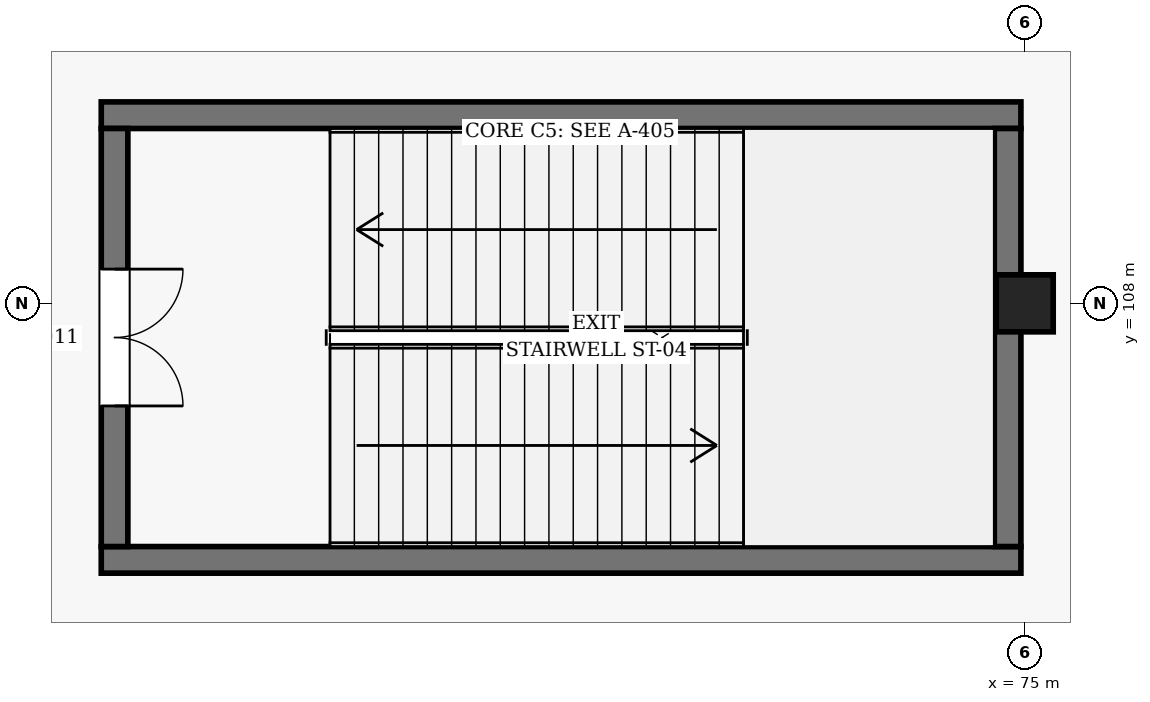
"""IFC4 building model, lengths in metres.
Left out: names, types, materials, properties, quantities, classifications, styles, units other than length and angle.
Written with IfcOpenShell. Run it as: python <this file> out.ifc"""

import sys

from ifc_helpers import new_model, si_unit, direction, frame, frame_2d, origin, origin_2d, place, context, subcontext, project, spatial, rectangle, extrude, element, fill, save


model = new_model("IFC4")
c1 = context("Model", 3, precision=1e-05, world=origin(), true_north=direction((0.0, 1.0)))
c2 = subcontext(c1, "Body", "Model", "MODEL_VIEW")
j1 = project(units=[si_unit("LENGTHUNIT", "METRE"), si_unit("PLANEANGLEUNIT", "RADIAN")], contexts=[c1])
p1 = place(None, origin())
s1 = spatial("IfcSite", under=j1, at=p1, CompositionType="ELEMENT")
p2 = place(p1, origin())
s2 = spatial("IfcBuilding", under=s1, at=p2, CompositionType="ELEMENT")
p3 = place(p2, origin())
s3 = spatial("IfcBuildingStorey", under=s2, at=p3, CompositionType="ELEMENT", Elevation=0.0)
p4 = place(p3, frame((75.0, 108.0, 0.0), z_axis=(0.0, 0.0, 1.0), x_axis=(1.0, 0.0, 0.0)))
e1 = element("IfcColumn", 1, at=p4, inside=s3, PredefinedType="COLUMN", context=c2, shape_type="SweptSolid", body=[
    extrude(rectangle(XDim=0.75, YDim=0.75, at=origin_2d()), origin(), (0.0, 0.0, 1.0), 5.4),
])
for number, where, z_axis, x_axis in (
    (2, (62.85, 104.625, 0.0), (0.0, 0.0, 1.0), (1.0, 0.0, 0.0)),
    (3, (74.95, 110.475, 0.0), (0.0, 0.0, 1.0), (-1.0, 0.0, 0.0)),
):
    element("IfcWall", number, at=place(p3, frame(where, z_axis=z_axis, x_axis=x_axis)), inside=s3, PredefinedType="SHEAR", context=c2, shape_type="SweptSolid", body=[
        extrude(rectangle(XDim=12.1, YDim=0.35, at=frame_2d((6.05, 0.0))), origin(), (0.0, 0.0, 1.0), 5.18),
    ])
p5 = place(p3, frame((63.025, 110.3, 0.0), z_axis=(0.0, 0.0, 1.0), x_axis=(0.0, -1.0, 0.0)))
e4 = element("IfcWall", 4, at=p5, inside=s3, PredefinedType="SHEAR", context=c2, shape_type="SweptSolid", body=[
    extrude(rectangle(XDim=5.5, YDim=0.35, at=frame_2d((2.75, 0.0))), origin(), (0.0, 0.0, 1.0), 5.18),
])
p6 = place(p5, frame((1.85, 0.0, 0.0)))
e5 = element("IfcOpeningElement", 5, at=p6, cuts=e4, PredefinedType="OPENING", context=c2, shape_type="SweptSolid", body=[
    extrude(rectangle(XDim=1.8, YDim=2.2, at=frame_2d((0.9, 1.1))), frame((0.0, 0.185, 0.0), z_axis=(0.0, -1.0, 0.0), x_axis=(1.0, 0.0, 0.0)), (0.0, 0.0, 1.0), 0.37),
])
p7 = place(p3, frame((74.775, 104.8, 0.0), z_axis=(0.0, 0.0, 1.0), x_axis=(0.0, 1.0, 0.0)))
e6 = element("IfcWall", 6, at=p7, inside=s3, PredefinedType="SHEAR", context=c2, shape_type="SweptSolid", body=[
    extrude(rectangle(XDim=5.5, YDim=0.35, at=frame_2d((2.75, 0.0))), origin(), (0.0, 0.0, 1.0), 5.18),
])
p8 = place(p6, origin())
e7 = element("IfcDoor", 7, at=p8, inside=s3, OperationType="DOUBLE_DOOR_SINGLE_SWING", PredefinedType="DOOR", context=c2, shape_type="SweptSolid", body=[
    extrude(rectangle(XDim=1.8, YDim=2.2, at=frame_2d((0.9, 1.1))), frame((0.0, 0.025, 0.0), z_axis=(0.0, -1.0, 0.0), x_axis=(1.0, 0.0, 0.0)), (0.0, 0.0, 1.0), 0.05),
])
fill(e5, e7)
save(model, sys.argv[1])
